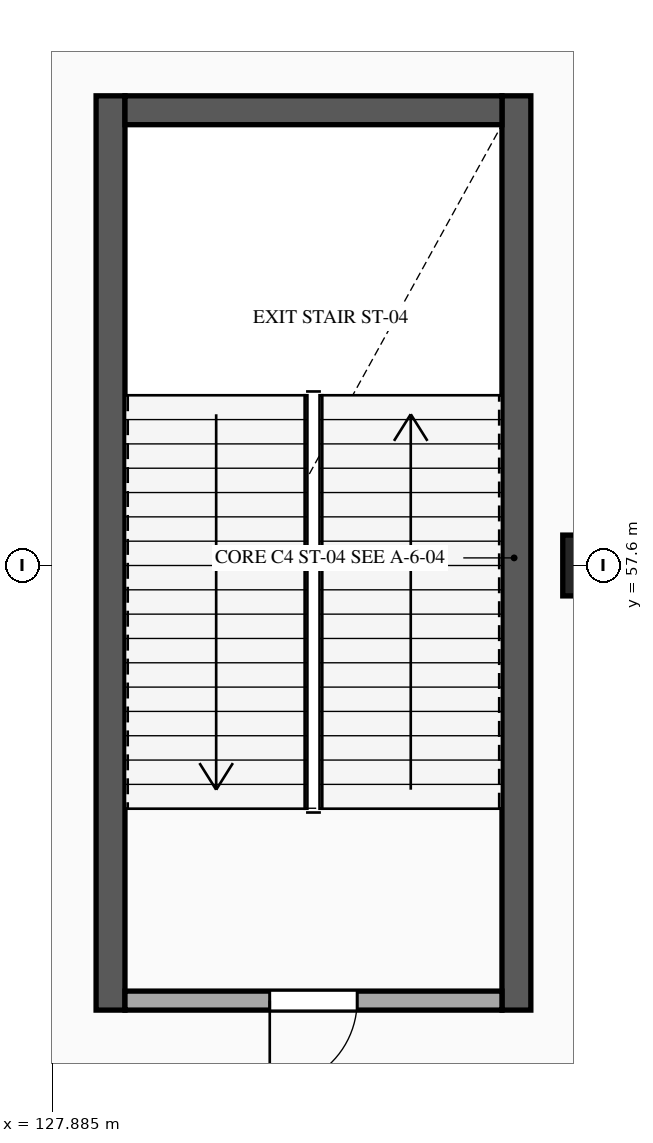
"""IFC4 building model, lengths in metres.
Left out: names, types, materials, properties, quantities, classifications, styles, units other than length and angle.
Written with IfcOpenShell. Run it as: python <this file> out.ifc"""

import sys

from ifc_helpers import new_model, si_unit, direction, frame, frame_2d, origin, origin_2d, place, context, subcontext, project, spatial, rectangle, extrude, element, fill, save


model = new_model("IFC4")
c1 = context("Model", 3, precision=1e-05, world=origin(), true_north=direction((0.0, 1.0)))
c2 = subcontext(c1, "Body", "Model", "MODEL_VIEW")
j1 = project(units=[si_unit("LENGTHUNIT", "METRE"), si_unit("PLANEANGLEUNIT", "RADIAN")], contexts=[c1])
p1 = place(None, origin())
s1 = spatial("IfcSite", under=j1, at=p1, CompositionType="ELEMENT")
p2 = place(p1, origin())
s2 = spatial("IfcBuilding", under=s1, at=p2, CompositionType="ELEMENT")
p3 = place(p2, origin())
s3 = spatial("IfcBuildingStorey", under=s2, at=p3, CompositionType="ELEMENT", Elevation=0.0)
p4 = place(p3, frame((135.0, 57.6, 0.0), z_axis=(0.0, 0.0, 1.0), x_axis=(1.0, 0.0, 0.0)))
e1 = element("IfcColumn", 1, at=p4, inside=s3, PredefinedType="COLUMN", context=c2, shape_type="SweptSolid", body=[
    extrude(rectangle(XDim=0.8, YDim=0.8, at=origin_2d()), origin(), (0.0, 0.0, 1.0), 5.4),
])
for number, where, z_axis, x_axis in (
    (2, (128.65, 51.75, 0.0), (0.0, 0.0, 1.0), (0.0, 1.0, 0.0)),
    (3, (133.99, 63.78, 0.0), (0.0, 0.0, 1.0), (0.0, -1.0, 0.0)),
):
    element("IfcWall", number, at=place(p3, frame(where, z_axis=z_axis, x_axis=x_axis)), inside=s3, PredefinedType="SHEAR", context=c2, shape_type="SweptSolid", body=[
        extrude(rectangle(XDim=12.03, YDim=0.38, at=frame_2d((6.015, 0.0))), origin(), (0.0, 0.0, 1.0), 5.12),
    ])
p5 = place(p3, frame((128.84, 63.59, 0.0), z_axis=(0.0, 0.0, 1.0), x_axis=(1.0, 0.0, 0.0)))
e4 = element("IfcWall", 4, at=p5, inside=s3, PredefinedType="SHEAR", context=c2, shape_type="SweptSolid", body=[
    extrude(rectangle(XDim=4.96, YDim=0.38, at=frame_2d((2.48, 0.0))), origin(), (0.0, 0.0, 1.0), 5.12),
])
p6 = place(p3, frame((133.8, 51.875, 0.0), z_axis=(0.0, 0.0, 1.0), x_axis=(-1.0, 0.0, 0.0)))
e5 = element("IfcWall", 5, at=p6, inside=s3, PredefinedType="STANDARD", context=c2, shape_type="SweptSolid", body=[
    extrude(rectangle(XDim=4.96, YDim=0.25, at=frame_2d((2.48, 0.0))), origin(), (0.0, 0.0, 1.0), 5.08),
])
p7 = place(p6, frame((1.905, 0.0, 0.0)))
e6 = element("IfcOpeningElement", 6, at=p7, cuts=e5, PredefinedType="OPENING", context=c2, shape_type="SweptSolid", body=[
    extrude(rectangle(XDim=1.15, YDim=2.2, at=frame_2d((0.575, 1.1))), frame((0.0, 0.135, 0.0), z_axis=(0.0, -1.0, 0.0), x_axis=(1.0, 0.0, 0.0)), (0.0, 0.0, 1.0), 0.27),
])
p8 = place(p7, origin())
e7 = element("IfcDoor", 7, at=p8, inside=s3, OperationType="SINGLE_SWING_RIGHT", PredefinedType="DOOR", context=c2, shape_type="SweptSolid", body=[
    extrude(rectangle(XDim=1.15, YDim=2.2, at=frame_2d((0.575, 1.1))), frame((0.0, 0.025, 0.0), z_axis=(0.0, -1.0, 0.0), x_axis=(1.0, 0.0, 0.0)), (0.0, 0.0, 1.0), 0.05),
])
fill(e6, e7)
save(model, sys.argv[1])
